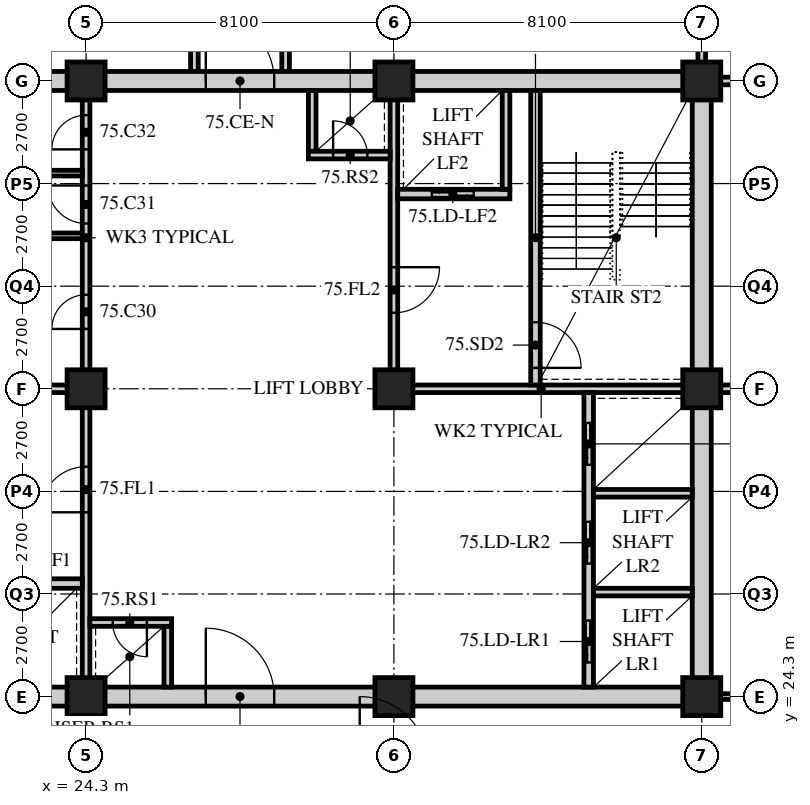
"""IFC4 building model, lengths in metres.
Left out: names, types, materials, properties, quantities, classifications, styles, units other than length and angle.
Written with IfcOpenShell. Run it as: python <this file> out.ifc"""

import sys

from ifc_helpers import new_model, si_unit, direction, frame, frame_2d, origin, origin_2d, place, context, subcontext, project, spatial, rectangle, hollow_rectangle, extrude, element, fill, save


model = new_model("IFC4")
c1 = context("Model", 3, precision=1e-05, world=origin(), true_north=direction((0.0, 1.0)))
c2 = subcontext(c1, "Body", "Model", "MODEL_VIEW")
j1 = project(units=[si_unit("LENGTHUNIT", "METRE"), si_unit("PLANEANGLEUNIT", "RADIAN")], contexts=[c1])
p1 = place(None, origin())
s1 = spatial("IfcSite", under=j1, at=p1, CompositionType="ELEMENT")
p2 = place(p1, origin())
s2 = spatial("IfcBuilding", under=s1, at=p2, CompositionType="ELEMENT")
p3 = place(p2, frame((0.0, 0.0, 293.1)))
s3 = spatial("IfcBuildingStorey", under=s2, at=p3, CompositionType="ELEMENT", Elevation=293.1)
for number, where, z_axis, x_axis in (
    (1, (24.3, 24.3, 0.0), (0.0, 0.0, 1.0), (1.0, 0.0, 0.0)),
    (2, (24.3, 32.4, 0.0), (0.0, 0.0, 1.0), (1.0, 0.0, 0.0)),
    (3, (24.3, 40.5, 0.0), (0.0, 0.0, 1.0), (1.0, 0.0, 0.0)),
    (4, (32.4, 24.3, 0.0), (0.0, 0.0, 1.0), (1.0, 0.0, 0.0)),
    (5, (32.4, 32.4, 0.0), (0.0, 0.0, 1.0), (1.0, 0.0, 0.0)),
    (6, (32.4, 40.5, 0.0), (0.0, 0.0, 1.0), (1.0, 0.0, 0.0)),
    (7, (40.5, 24.3, 0.0), (0.0, 0.0, 1.0), (1.0, 0.0, 0.0)),
    (8, (40.5, 32.4, 0.0), (0.0, 0.0, 1.0), (1.0, 0.0, 0.0)),
    (9, (40.5, 40.5, 0.0), (0.0, 0.0, 1.0), (1.0, 0.0, 0.0)),
):
    element("IfcColumn", number, at=place(p3, frame(where, z_axis=z_axis, x_axis=x_axis)), inside=s3, PredefinedType="COLUMN", context=c2, shape_type="SweptSolid", body=[
        extrude(hollow_rectangle(XDim=1.0, YDim=1.0, WallThickness=0.1, at=origin_2d()), origin(), (0.0, 0.0, 1.0), 5.4),
    ])
p4 = place(p3, frame((40.7, 24.3, 0.0), z_axis=(0.0, 0.0, 1.0), x_axis=(1.0, 0.0, 0.0)))
e10 = element("IfcWall", 10, at=p4, inside=s3, PredefinedType="PARTITIONING", context=c2, shape_type="SweptSolid", body=[
    extrude(rectangle(XDim=6.1, YDim=0.15, at=frame_2d((3.05, 0.0))), origin(), (0.0, 0.0, 1.0), 4.271),
])
p5 = place(p3, frame((40.5, 32.4, 0.0), z_axis=(0.0, 0.0, 1.0), x_axis=(1.0, 0.0, 0.0)))
e11 = element("IfcWall", 11, at=p5, inside=s3, PredefinedType="SOLIDWALL", context=c2, shape_type="SweptSolid", body=[
    extrude(rectangle(XDim=6.3, YDim=0.2, at=frame_2d((3.15, 0.0))), origin(), (0.0, 0.0, 1.0), 4.271),
])
p6 = place(p3, frame((40.5, 40.5, 0.0), z_axis=(0.0, 0.0, 1.0), x_axis=(0.0, 1.0, 0.0)))
e12 = element("IfcWall", 12, at=p6, inside=s3, PredefinedType="SOLIDWALL", context=c2, shape_type="SweptSolid", body=[
    extrude(rectangle(XDim=14.4, YDim=0.2, at=frame_2d((7.2, 0.0))), origin(), (0.0, 0.0, 1.0), 4.271),
])
for number, where, z_axis, x_axis in (
    (13, (27.15, 40.5, 0.0), (0.0, 0.0, 1.0), (0.0, 1.0, 0.0)),
    (14, (29.55, 40.5, 0.0), (0.0, 0.0, 1.0), (0.0, 1.0, 0.0)),
):
    element("IfcWall", number, at=place(p3, frame(where, z_axis=z_axis, x_axis=x_axis)), inside=s3, PredefinedType="SOLIDWALL", context=c2, shape_type="SweptSolid", body=[
        extrude(rectangle(XDim=14.4, YDim=0.2, at=frame_2d((7.2, 0.0))), origin(), (0.0, 0.0, 1.0), 5.19),
    ])
p7 = place(p3, frame((40.5, 40.5, 0.0), z_axis=(0.0, 0.0, 1.0), x_axis=(1.0, 0.0, 0.0)))
e15 = element("IfcWall", 15, at=p7, inside=s3, PredefinedType="SOLIDWALL", context=c2, shape_type="SweptSolid", body=[
    extrude(rectangle(XDim=6.3, YDim=0.2, at=frame_2d((3.15, 0.0))), origin(), (0.0, 0.0, 1.0), 4.271),
])
p8 = place(p3, frame((15.95, 24.3, 0.0), z_axis=(0.0, 0.0, 1.0), x_axis=(1.0, 0.0, 0.0)))
e16 = element("IfcWall", 16, at=p8, inside=s3, PredefinedType="SOLIDWALL", context=c2, shape_type="SweptSolid", body=[
    extrude(rectangle(XDim=24.8, YDim=0.5, at=frame_2d((12.4, 0.0))), origin(), (0.0, 0.0, 1.0), 4.271),
])
p9 = place(p8, frame((11.5, 0.0, 0.0)))
e17 = element("IfcOpeningElement", 17, at=p9, cuts=e16, PredefinedType="OPENING", context=c2, shape_type="SweptSolid", body=[
    extrude(rectangle(XDim=1.8, YDim=2.4, at=frame_2d((0.9, 1.2))), frame((0.0, 0.26, 0.0), z_axis=(0.0, -1.0, 0.0), x_axis=(1.0, 0.0, 0.0)), (0.0, 0.0, 1.0), 0.52),
])
p10 = place(p3, frame((15.95, 40.5, 0.0), z_axis=(0.0, 0.0, 1.0), x_axis=(1.0, 0.0, 0.0)))
e18 = element("IfcWall", 18, at=p10, inside=s3, PredefinedType="SOLIDWALL", context=c2, shape_type="SweptSolid", body=[
    extrude(rectangle(XDim=24.8, YDim=0.5, at=frame_2d((12.4, 0.0))), origin(), (0.0, 0.0, 1.0), 4.271),
])
p11 = place(p10, frame((11.5, 0.0, 0.0)))
e19 = element("IfcOpeningElement", 19, at=p11, cuts=e18, PredefinedType="OPENING", context=c2, shape_type="SweptSolid", body=[
    extrude(rectangle(XDim=1.8, YDim=2.4, at=frame_2d((0.9, 1.2))), frame((0.0, 0.26, 0.0), z_axis=(0.0, -1.0, 0.0), x_axis=(1.0, 0.0, 0.0)), (0.0, 0.0, 1.0), 0.52),
])
p12 = place(p3, frame((40.5, 24.55, 0.0), z_axis=(0.0, 0.0, 1.0), x_axis=(0.0, 1.0, 0.0)))
e20 = element("IfcWall", 20, at=p12, inside=s3, PredefinedType="SOLIDWALL", context=c2, shape_type="SweptSolid", body=[
    extrude(rectangle(XDim=15.7, YDim=0.5, at=frame_2d((7.85, 0.0))), origin(), (0.0, 0.0, 1.0), 4.271),
])
p13 = place(p3, frame((16.45, 32.4, 0.0), z_axis=(0.0, 0.0, 1.0), x_axis=(1.0, 0.0, 0.0)))
e21 = element("IfcWall", 21, at=p13, inside=s3, PredefinedType="SOLIDWALL", context=c2, shape_type="SweptSolid", body=[
    extrude(rectangle(XDim=7.95, YDim=0.2, at=frame_2d((3.975, 0.0))), origin(), (0.0, 0.0, 1.0), 4.428),
])
p14 = place(p3, frame((24.3, 24.55, 0.0), z_axis=(0.0, 0.0, 1.0), x_axis=(0.0, 1.0, 0.0)))
e22 = element("IfcWall", 22, at=p14, inside=s3, PredefinedType="SOLIDWALL", context=c2, shape_type="SweptSolid", body=[
    extrude(rectangle(XDim=7.75, YDim=0.2, at=frame_2d((3.875, 0.0))), origin(), (0.0, 0.0, 1.0), 4.428),
])
p15 = place(p14, frame((4.6, 0.0, 0.0)))
e23 = element("IfcOpeningElement", 23, at=p15, cuts=e22, PredefinedType="OPENING", context=c2, shape_type="SweptSolid", body=[
    extrude(rectangle(XDim=1.2, YDim=2.1, at=frame_2d((0.6, 1.05))), frame((0.0, 0.11, 0.0), z_axis=(0.0, -1.0, 0.0), x_axis=(1.0, 0.0, 0.0)), (0.0, 0.0, 1.0), 0.22),
])
p16 = place(p3, frame((21.25, 27.275, 0.0), z_axis=(0.0, 0.0, 1.0), x_axis=(1.0, 0.0, 0.0)))
e24 = element("IfcWall", 24, at=p16, inside=s3, PredefinedType="SOLIDWALL", context=c2, shape_type="SweptSolid", body=[
    extrude(rectangle(XDim=2.95, YDim=0.25, at=frame_2d((1.475, 0.0))), origin(), (0.0, 0.0, 1.0), 5.19),
])
p17 = place(p16, frame((0.95, 0.0, 0.0)))
e25 = element("IfcOpeningElement", 25, at=p17, cuts=e24, PredefinedType="OPENING", context=c2, shape_type="SweptSolid", body=[
    extrude(rectangle(XDim=1.1, YDim=2.4, at=frame_2d((0.55, 1.2))), frame((0.0, 0.135, 0.0), z_axis=(0.0, -1.0, 0.0), x_axis=(1.0, 0.0, 0.0)), (0.0, 0.0, 1.0), 0.27),
])
p18 = place(p3, frame((26.45, 24.55, 0.0), z_axis=(0.0, 0.0, 1.0), x_axis=(0.0, 1.0, 0.0)))
e26 = element("IfcWall", 26, at=p18, inside=s3, PredefinedType="SOLIDWALL", context=c2, shape_type="SweptSolid", body=[
    extrude(rectangle(XDim=1.6, YDim=0.2, at=frame_2d((0.8, 0.0))), origin(), (0.0, 0.0, 1.0), 5.19),
])
p19 = place(p3, frame((24.4, 26.25, 0.0), z_axis=(0.0, 0.0, 1.0), x_axis=(1.0, 0.0, 0.0)))
e27 = element("IfcWall", 27, at=p19, inside=s3, PredefinedType="SOLIDWALL", context=c2, shape_type="SweptSolid", body=[
    extrude(rectangle(XDim=2.15, YDim=0.2, at=frame_2d((1.075, 0.0))), origin(), (0.0, 0.0, 1.0), 5.19),
])
p20 = place(p19, frame((0.6, 0.0, 0.0)))
e28 = element("IfcOpeningElement", 28, at=p20, cuts=e27, PredefinedType="OPENING", context=c2, shape_type="SweptSolid", body=[
    extrude(rectangle(XDim=0.9, YDim=2.1, at=frame_2d((0.45, 1.05))), frame((0.0, 0.11, 0.0), z_axis=(0.0, -1.0, 0.0), x_axis=(1.0, 0.0, 0.0)), (0.0, 0.0, 1.0), 0.22),
])
p21 = place(p3, frame((32.3, 32.4, 0.0), z_axis=(0.0, 0.0, 1.0), x_axis=(1.0, 0.0, 0.0)))
e29 = element("IfcWall", 29, at=p21, inside=s3, PredefinedType="SOLIDWALL", context=c2, shape_type="SweptSolid", body=[
    extrude(rectangle(XDim=7.95, YDim=0.2, at=frame_2d((3.975, 0.0))), origin(), (0.0, 0.0, 1.0), 4.428),
])
p22 = place(p3, frame((32.4, 32.5, 0.0), z_axis=(0.0, 0.0, 1.0), x_axis=(0.0, 1.0, 0.0)))
e30 = element("IfcWall", 30, at=p22, inside=s3, PredefinedType="SOLIDWALL", context=c2, shape_type="SweptSolid", body=[
    extrude(rectangle(XDim=7.75, YDim=0.2, at=frame_2d((3.875, 0.0))), origin(), (0.0, 0.0, 1.0), 4.428),
])
p23 = place(p22, frame((1.9, 0.0, 0.0)))
e31 = element("IfcOpeningElement", 31, at=p23, cuts=e30, PredefinedType="OPENING", context=c2, shape_type="SweptSolid", body=[
    extrude(rectangle(XDim=1.2, YDim=2.1, at=frame_2d((0.6, 1.05))), frame((0.0, 0.11, 0.0), z_axis=(0.0, -1.0, 0.0), x_axis=(1.0, 0.0, 0.0)), (0.0, 0.0, 1.0), 0.22),
])
p24 = place(p3, frame((37.525, 24.55, 0.0), z_axis=(0.0, 0.0, 1.0), x_axis=(0.0, 1.0, 0.0)))
e32 = element("IfcWall", 32, at=p24, inside=s3, PredefinedType="SOLIDWALL", context=c2, shape_type="SweptSolid", body=[
    extrude(rectangle(XDim=7.75, YDim=0.25, at=frame_2d((3.875, 0.0))), origin(), (0.0, 0.0, 1.0), 5.19),
])
p25 = place(p24, frame((0.65, 0.0, 0.0)))
e33 = element("IfcOpeningElement", 33, at=p25, cuts=e32, PredefinedType="OPENING", context=c2, shape_type="SweptSolid", body=[
    extrude(rectangle(XDim=1.1, YDim=2.4, at=frame_2d((0.55, 1.2))), frame((0.0, 0.135, 0.0), z_axis=(0.0, -1.0, 0.0), x_axis=(1.0, 0.0, 0.0)), (0.0, 0.0, 1.0), 0.27),
])
p26 = place(p24, frame((3.25, 0.0, 0.0)))
e34 = element("IfcOpeningElement", 34, at=p26, cuts=e32, PredefinedType="OPENING", context=c2, shape_type="SweptSolid", body=[
    extrude(rectangle(XDim=1.1, YDim=2.4, at=frame_2d((0.55, 1.2))), frame((0.0, 0.135, 0.0), z_axis=(0.0, -1.0, 0.0), x_axis=(1.0, 0.0, 0.0)), (0.0, 0.0, 1.0), 0.27),
])
p27 = place(p24, frame((5.85, 0.0, 0.0)))
e35 = element("IfcOpeningElement", 35, at=p27, cuts=e32, PredefinedType="OPENING", context=c2, shape_type="SweptSolid", body=[
    extrude(rectangle(XDim=1.1, YDim=2.4, at=frame_2d((0.55, 1.2))), frame((0.0, 0.135, 0.0), z_axis=(0.0, -1.0, 0.0), x_axis=(1.0, 0.0, 0.0)), (0.0, 0.0, 1.0), 0.27),
])
for number, where, z_axis, x_axis in (
    (36, (37.65, 27.05, 0.0), (0.0, 0.0, 1.0), (1.0, 0.0, 0.0)),
    (37, (37.65, 29.65, 0.0), (0.0, 0.0, 1.0), (1.0, 0.0, 0.0)),
):
    element("IfcWall", number, at=place(p3, frame(where, z_axis=z_axis, x_axis=x_axis)), inside=s3, PredefinedType="SOLIDWALL", context=c2, shape_type="SweptSolid", body=[
        extrude(rectangle(XDim=2.6, YDim=0.2, at=frame_2d((1.3, 0.0))), origin(), (0.0, 0.0, 1.0), 5.19),
    ])
p28 = place(p3, frame((36.125, 32.5, 0.0), z_axis=(0.0, 0.0, 1.0), x_axis=(0.0, 1.0, 0.0)))
e38 = element("IfcWall", 38, at=p28, inside=s3, PredefinedType="SOLIDWALL", context=c2, shape_type="SweptSolid", body=[
    extrude(rectangle(XDim=7.75, YDim=0.25, at=frame_2d((3.875, 0.0))), origin(), (0.0, 0.0, 1.0), 5.19),
])
p29 = place(p28, frame((0.45, 0.0, 0.0)))
e39 = element("IfcOpeningElement", 39, at=p29, cuts=e38, PredefinedType="OPENING", context=c2, shape_type="SweptSolid", body=[
    extrude(rectangle(XDim=1.2, YDim=2.1, at=frame_2d((0.6, 1.05))), frame((0.0, 0.135, 0.0), z_axis=(0.0, -1.0, 0.0), x_axis=(1.0, 0.0, 0.0)), (0.0, 0.0, 1.0), 0.27),
])
p30 = place(p3, frame((32.5, 37.525, 0.0), z_axis=(0.0, 0.0, 1.0), x_axis=(1.0, 0.0, 0.0)))
e40 = element("IfcWall", 40, at=p30, inside=s3, PredefinedType="SOLIDWALL", context=c2, shape_type="SweptSolid", body=[
    extrude(rectangle(XDim=2.95, YDim=0.25, at=frame_2d((1.475, 0.0))), origin(), (0.0, 0.0, 1.0), 5.19),
])
p31 = place(p30, frame((0.9, 0.0, 0.0)))
e41 = element("IfcOpeningElement", 41, at=p31, cuts=e40, PredefinedType="OPENING", context=c2, shape_type="SweptSolid", body=[
    extrude(rectangle(XDim=1.1, YDim=2.4, at=frame_2d((0.55, 1.2))), frame((0.0, 0.135, 0.0), z_axis=(0.0, -1.0, 0.0), x_axis=(1.0, 0.0, 0.0)), (0.0, 0.0, 1.0), 0.27),
])
p32 = place(p3, frame((35.35, 37.65, 0.0), z_axis=(0.0, 0.0, 1.0), x_axis=(0.0, 1.0, 0.0)))
e42 = element("IfcWall", 42, at=p32, inside=s3, PredefinedType="SOLIDWALL", context=c2, shape_type="SweptSolid", body=[
    extrude(rectangle(XDim=2.6, YDim=0.2, at=frame_2d((1.3, 0.0))), origin(), (0.0, 0.0, 1.0), 5.19),
])
p33 = place(p3, frame((30.25, 38.65, 0.0), z_axis=(0.0, 0.0, 1.0), x_axis=(0.0, 1.0, 0.0)))
e43 = element("IfcWall", 43, at=p33, inside=s3, PredefinedType="SOLIDWALL", context=c2, shape_type="SweptSolid", body=[
    extrude(rectangle(XDim=1.6, YDim=0.2, at=frame_2d((0.8, 0.0))), origin(), (0.0, 0.0, 1.0), 5.19),
])
p34 = place(p3, frame((30.15, 38.55, 0.0), z_axis=(0.0, 0.0, 1.0), x_axis=(1.0, 0.0, 0.0)))
e44 = element("IfcWall", 44, at=p34, inside=s3, PredefinedType="SOLIDWALL", context=c2, shape_type="SweptSolid", body=[
    extrude(rectangle(XDim=2.15, YDim=0.2, at=frame_2d((1.075, 0.0))), origin(), (0.0, 0.0, 1.0), 5.19),
])
p35 = place(p34, frame((0.65, 0.0, 0.0)))
e45 = element("IfcOpeningElement", 45, at=p35, cuts=e44, PredefinedType="OPENING", context=c2, shape_type="SweptSolid", body=[
    extrude(rectangle(XDim=0.9, YDim=2.1, at=frame_2d((0.45, 1.05))), frame((0.0, 0.11, 0.0), z_axis=(0.0, -1.0, 0.0), x_axis=(1.0, 0.0, 0.0)), (0.0, 0.0, 1.0), 0.22),
])
p36 = place(p3, frame((24.3, 32.5, 0.0), z_axis=(0.0, 0.0, 1.0), x_axis=(0.0, 1.0, 0.0)))
e46 = element("IfcWall", 46, at=p36, inside=s3, PredefinedType="PARTITIONING", context=c2, shape_type="SweptSolid", body=[
    extrude(rectangle(XDim=7.75, YDim=0.2, at=frame_2d((3.875, 0.0))), origin(), (0.0, 0.0, 1.0), 4.428),
])
p37 = place(p36, frame((1.475, 0.0, 0.0)))
e47 = element("IfcOpeningElement", 47, at=p37, cuts=e46, PredefinedType="OPENING", context=c2, shape_type="SweptSolid", body=[
    extrude(rectangle(XDim=0.9, YDim=2.1, at=frame_2d((0.45, 1.05))), frame((0.0, 0.11, 0.0), z_axis=(0.0, -1.0, 0.0), x_axis=(1.0, 0.0, 0.0)), (0.0, 0.0, 1.0), 0.22),
])
p38 = place(p36, frame((4.25, 0.0, 0.0)))
e48 = element("IfcOpeningElement", 48, at=p38, cuts=e46, PredefinedType="OPENING", context=c2, shape_type="SweptSolid", body=[
    extrude(rectangle(XDim=1.0, YDim=2.1, at=frame_2d((0.5, 1.05))), frame((0.0, 0.11, 0.0), z_axis=(0.0, -1.0, 0.0), x_axis=(1.0, 0.0, 0.0)), (0.0, 0.0, 1.0), 0.22),
])
p39 = place(p36, frame((6.2, 0.0, 0.0)))
e49 = element("IfcOpeningElement", 49, at=p39, cuts=e46, PredefinedType="OPENING", context=c2, shape_type="SweptSolid", body=[
    extrude(rectangle(XDim=0.9, YDim=2.1, at=frame_2d((0.45, 1.05))), frame((0.0, 0.11, 0.0), z_axis=(0.0, -1.0, 0.0), x_axis=(1.0, 0.0, 0.0)), (0.0, 0.0, 1.0), 0.22),
])
p40 = place(p3, frame((21.2, 36.425, 0.0), z_axis=(0.0, 0.0, 1.0), x_axis=(1.0, 0.0, 0.0)))
e50 = element("IfcWall", 50, at=p40, inside=s3, PredefinedType="PARTITIONING", context=c2, shape_type="SweptSolid", body=[
    extrude(rectangle(XDim=3.0, YDim=0.15, at=frame_2d((1.5, 0.0))), origin(), (0.0, 0.0, 1.0), 5.19),
])
p41 = place(p3, frame((21.05, 38.075, 0.0), z_axis=(0.0, 0.0, 1.0), x_axis=(1.0, 0.0, 0.0)))
e51 = element("IfcWall", 51, at=p41, inside=s3, PredefinedType="PARTITIONING", context=c2, shape_type="SweptSolid", body=[
    extrude(rectangle(XDim=3.15, YDim=0.15, at=frame_2d((1.575, 0.0))), origin(), (0.0, 0.0, 1.0), 5.19),
])
p42 = place(p37, origin())
e52 = element("IfcDoor", 52, at=p42, inside=s3, OperationType="SINGLE_SWING_LEFT", PredefinedType="DOOR", context=c2, shape_type="SweptSolid", body=[
    extrude(rectangle(XDim=0.9, YDim=2.1, at=frame_2d((0.45, 1.05))), frame((0.0, 0.025, 0.0), z_axis=(0.0, -1.0, 0.0), x_axis=(1.0, 0.0, 0.0)), (0.0, 0.0, 1.0), 0.05),
])
fill(e47, e52)
p43 = place(p38, origin())
e53 = element("IfcDoor", 53, at=p43, inside=s3, OperationType="SINGLE_SWING_RIGHT", PredefinedType="DOOR", context=c2, shape_type="SweptSolid", body=[
    extrude(rectangle(XDim=1.0, YDim=2.1, at=frame_2d((0.5, 1.05))), frame((0.0, 0.025, 0.0), z_axis=(0.0, -1.0, 0.0), x_axis=(1.0, 0.0, 0.0)), (0.0, 0.0, 1.0), 0.05),
])
fill(e48, e53)
p44 = place(p39, origin())
e54 = element("IfcDoor", 54, at=p44, inside=s3, OperationType="SINGLE_SWING_LEFT", PredefinedType="DOOR", context=c2, shape_type="SweptSolid", body=[
    extrude(rectangle(XDim=0.9, YDim=2.1, at=frame_2d((0.45, 1.05))), frame((0.0, 0.025, 0.0), z_axis=(0.0, -1.0, 0.0), x_axis=(1.0, 0.0, 0.0)), (0.0, 0.0, 1.0), 0.05),
])
fill(e49, e54)
p45 = place(p15, origin())
e55 = element("IfcDoor", 55, at=p45, inside=s3, OperationType="SINGLE_SWING_LEFT", PredefinedType="DOOR", context=c2, shape_type="SweptSolid", body=[
    extrude(rectangle(XDim=1.2, YDim=2.1, at=frame_2d((0.6, 1.05))), frame((0.0, 0.025, 0.0), z_axis=(0.0, -1.0, 0.0), x_axis=(1.0, 0.0, 0.0)), (0.0, 0.0, 1.0), 0.05),
])
fill(e23, e55)
p46 = place(p20, origin())
e56 = element("IfcDoor", 56, at=p46, inside=s3, OperationType="SINGLE_SWING_LEFT", PredefinedType="DOOR", context=c2, shape_type="SweptSolid", body=[
    extrude(rectangle(XDim=0.9, YDim=2.1, at=frame_2d((0.45, 1.05))), frame((0.0, 0.025, 0.0), z_axis=(0.0, -1.0, 0.0), x_axis=(1.0, 0.0, 0.0)), (0.0, 0.0, 1.0), 0.05),
])
fill(e28, e56)
p47 = place(p29, origin())
e57 = element("IfcDoor", 57, at=p47, inside=s3, OperationType="SINGLE_SWING_RIGHT", PredefinedType="DOOR", context=c2, shape_type="SweptSolid", body=[
    extrude(rectangle(XDim=1.2, YDim=2.1, at=frame_2d((0.6, 1.05))), frame((0.0, 0.025, 0.0), z_axis=(0.0, -1.0, 0.0), x_axis=(1.0, 0.0, 0.0)), (0.0, 0.0, 1.0), 0.05),
])
fill(e39, e57)
p48 = place(p23, origin())
e58 = element("IfcDoor", 58, at=p48, inside=s3, OperationType="SINGLE_SWING_LEFT", PredefinedType="DOOR", context=c2, shape_type="SweptSolid", body=[
    extrude(rectangle(XDim=1.2, YDim=2.1, at=frame_2d((0.6, 1.05))), frame((0.0, 0.025, 0.0), z_axis=(0.0, -1.0, 0.0), x_axis=(1.0, 0.0, 0.0)), (0.0, 0.0, 1.0), 0.05),
])
fill(e31, e58)
p49 = place(p35, origin())
e59 = element("IfcDoor", 59, at=p49, inside=s3, OperationType="SINGLE_SWING_LEFT", PredefinedType="DOOR", context=c2, shape_type="SweptSolid", body=[
    extrude(rectangle(XDim=0.9, YDim=2.1, at=frame_2d((0.45, 1.05))), frame((0.0, 0.025, 0.0), z_axis=(0.0, -1.0, 0.0), x_axis=(1.0, 0.0, 0.0)), (0.0, 0.0, 1.0), 0.05),
])
fill(e45, e59)
p50 = place(p25, origin())
e60 = element("IfcDoor", 60, at=p50, inside=s3, OperationType="DOUBLE_DOOR_SLIDING", PredefinedType="DOOR", context=c2, shape_type="SweptSolid", body=[
    extrude(rectangle(XDim=1.1, YDim=2.4, at=frame_2d((0.55, 1.2))), frame((0.0, 0.025, 0.0), z_axis=(0.0, -1.0, 0.0), x_axis=(1.0, 0.0, 0.0)), (0.0, 0.0, 1.0), 0.05),
])
fill(e33, e60)
p51 = place(p26, origin())
e61 = element("IfcDoor", 61, at=p51, inside=s3, OperationType="DOUBLE_DOOR_SLIDING", PredefinedType="DOOR", context=c2, shape_type="SweptSolid", body=[
    extrude(rectangle(XDim=1.1, YDim=2.4, at=frame_2d((0.55, 1.2))), frame((0.0, 0.025, 0.0), z_axis=(0.0, -1.0, 0.0), x_axis=(1.0, 0.0, 0.0)), (0.0, 0.0, 1.0), 0.05),
])
fill(e34, e61)
p52 = place(p27, origin())
e62 = element("IfcDoor", 62, at=p52, inside=s3, OperationType="DOUBLE_DOOR_SLIDING", PredefinedType="DOOR", context=c2, shape_type="SweptSolid", body=[
    extrude(rectangle(XDim=1.1, YDim=2.4, at=frame_2d((0.55, 1.2))), frame((0.0, 0.025, 0.0), z_axis=(0.0, -1.0, 0.0), x_axis=(1.0, 0.0, 0.0)), (0.0, 0.0, 1.0), 0.05),
])
fill(e35, e62)
p53 = place(p31, origin())
e63 = element("IfcDoor", 63, at=p53, inside=s3, OperationType="DOUBLE_DOOR_SLIDING", PredefinedType="DOOR", context=c2, shape_type="SweptSolid", body=[
    extrude(rectangle(XDim=1.1, YDim=2.4, at=frame_2d((0.55, 1.2))), frame((0.0, 0.025, 0.0), z_axis=(0.0, -1.0, 0.0), x_axis=(1.0, 0.0, 0.0)), (0.0, 0.0, 1.0), 0.05),
])
fill(e41, e63)
p54 = place(p9, origin())
e64 = element("IfcDoor", 64, at=p54, inside=s3, OperationType="DOUBLE_DOOR_SINGLE_SWING", PredefinedType="DOOR", context=c2, shape_type="SweptSolid", body=[
    extrude(rectangle(XDim=1.8, YDim=2.4, at=frame_2d((0.9, 1.2))), frame((0.0, 0.025, 0.0), z_axis=(0.0, -1.0, 0.0), x_axis=(1.0, 0.0, 0.0)), (0.0, 0.0, 1.0), 0.05),
])
fill(e17, e64)
p55 = place(p11, origin())
e65 = element("IfcDoor", 65, at=p55, inside=s3, OperationType="DOUBLE_DOOR_SINGLE_SWING", PredefinedType="DOOR", context=c2, shape_type="SweptSolid", body=[
    extrude(rectangle(XDim=1.8, YDim=2.4, at=frame_2d((0.9, 1.2))), frame((0.0, 0.025, 0.0), z_axis=(0.0, -1.0, 0.0), x_axis=(1.0, 0.0, 0.0)), (0.0, 0.0, 1.0), 0.05),
])
fill(e19, e65)
save(model, sys.argv[1])
